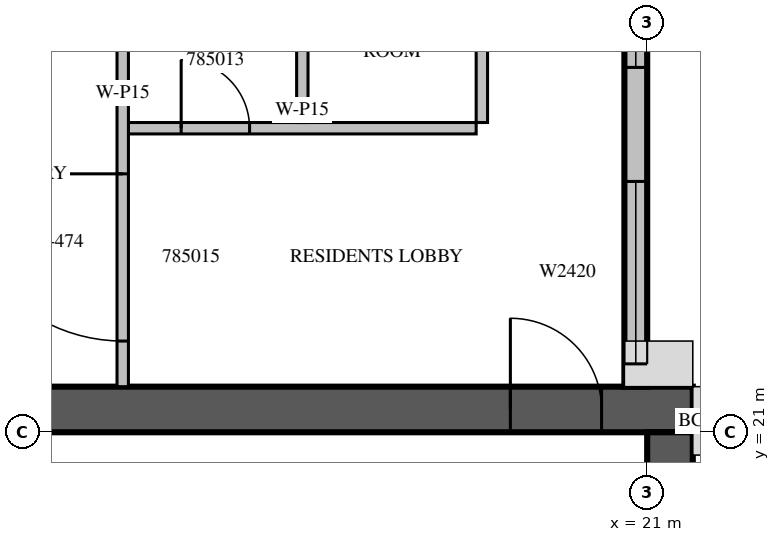
"""IFC4 building model, lengths in metres.
Left out: names, types, materials, properties, quantities, classifications, styles, units other than length and angle.
Written with IfcOpenShell. Run it as: python <this file> out.ifc"""

import sys

from ifc_helpers import new_model, si_unit, direction, frame, frame_2d, origin, place, context, subcontext, project, spatial, rectangle, extrude, source, transform, mapped, element, fill, save


model = new_model("IFC4")
c1 = context("Model", 3, precision=1e-05, world=origin(), true_north=direction((0.0, 1.0)))
c2 = subcontext(c1, "Body", "Model", "MODEL_VIEW")
j1 = project(units=[si_unit("LENGTHUNIT", "METRE"), si_unit("PLANEANGLEUNIT", "RADIAN")], contexts=[c1])
p1 = place(None, origin())
s1 = spatial("IfcSite", under=j1, at=p1, CompositionType="ELEMENT")
p2 = place(p1, origin())
s2 = spatial("IfcBuilding", under=s1, at=p2, CompositionType="ELEMENT")
p3 = place(p2, frame((0.0, 0.0, 358.0)))
s3 = spatial("IfcBuildingStorey", under=s2, at=p3, CompositionType="ELEMENT", Elevation=358.0)
m1 = source(origin(), c2, "Body", "SweptSolid", [
    extrude(rectangle(XDim=11.1, YDim=0.6, at=frame_2d((5.55, 0.0))), origin(), (0.0, 0.0, 1.0), 3.5),
])
p4 = place(p3, frame((10.5, 21.3, 0.0), z_axis=(0.0, 0.0, 1.0), x_axis=(1.0, 0.0, 0.0)))
e1 = element("IfcWall", 1, at=p4, inside=s3, PredefinedType="SHEAR", context=c2, shape_type="MappedRepresentation", body=[
    mapped(m1, transform((0.0, 0.0, 0.0), scale=1.0)),
])
m2 = source(origin(), c2, "Body", "SweptSolid", [
    extrude(rectangle(XDim=1.2, YDim=2.1, at=frame_2d((0.6, 1.05))), frame((0.0, 0.31, 0.0), z_axis=(0.0, -1.0, 0.0), x_axis=(1.0, 0.0, 0.0)), (0.0, 0.0, 1.0), 0.62),
])
p5 = place(p4, frame((8.7, 0.0, 0.0)))
e2 = element("IfcOpeningElement", 2, at=p5, cuts=e1, PredefinedType="OPENING", context=c2, shape_type="MappedRepresentation", body=[
    mapped(m2, transform((0.0, 0.0, 0.0), scale=1.0)),
])
m3 = source(origin(), c2, "Body", "SweptSolid", [
    extrude(rectangle(XDim=10.5, YDim=0.6, at=frame_2d((5.25, 0.0))), origin(), (0.0, 0.0, 1.0), 3.5),
])
p6 = place(p3, frame((21.3, 10.5, 0.0), z_axis=(0.0, 0.0, 1.0), x_axis=(0.0, 1.0, 0.0)))
e3 = element("IfcWall", 3, at=p6, inside=s3, PredefinedType="SHEAR", context=c2, shape_type="MappedRepresentation", body=[
    mapped(m3, transform((0.0, 0.0, 0.0), scale=1.0)),
])
m4 = source(origin(), c2, "Body", "SweptSolid", [
    extrude(rectangle(XDim=1.2, YDim=2.4, at=frame_2d((0.6, 1.2))), frame((0.0, 0.31, 0.0), z_axis=(0.0, -1.0, 0.0), x_axis=(1.0, 0.0, 0.0)), (0.0, 0.0, 1.0), 0.62),
])
p7 = place(p6, frame((5.7, 0.0, 0.6)))
e4 = element("IfcOpeningElement", 4, at=p7, cuts=e3, PredefinedType="OPENING", context=c2, shape_type="MappedRepresentation", body=[
    mapped(m4, transform((0.0, 0.0, 0.0), scale=1.0)),
])
m5 = source(origin(), c2, "Body", "SweptSolid", [
    extrude(rectangle(XDim=7.5, YDim=0.3, at=frame_2d((3.75, 0.0))), origin(), (0.0, 0.0, 1.0), 3.1),
])
p8 = place(p3, frame((20.85, 21.6, 0.0), z_axis=(0.0, 0.0, 1.0), x_axis=(0.0, 1.0, 0.0)))
e5 = element("IfcWall", 5, at=p8, inside=s3, PredefinedType="STANDARD", context=c2, shape_type="MappedRepresentation", body=[
    mapped(m5, transform((0.0, 0.0, 0.0), scale=1.0)),
])
m6 = source(origin(), c2, "Body", "SweptSolid", [
    extrude(rectangle(XDim=2.4, YDim=2.0, at=frame_2d((1.2, 1.0))), frame((0.0, 0.16, 0.0), z_axis=(0.0, -1.0, 0.0), x_axis=(1.0, 0.0, 0.0)), (0.0, 0.0, 1.0), 0.32),
])
p9 = place(p8, frame((0.3, 0.0, 0.6)))
e6 = element("IfcOpeningElement", 6, at=p9, cuts=e5, PredefinedType="OPENING", context=c2, shape_type="MappedRepresentation", body=[
    mapped(m6, transform((0.0, 0.0, 0.0), scale=1.0)),
])
m7 = source(origin(), c2, "Body", "SweptSolid", [
    extrude(rectangle(XDim=3.0, YDim=2.0, at=frame_2d((1.5, 1.0))), frame((0.0, 0.16, 0.0), z_axis=(0.0, -1.0, 0.0), x_axis=(1.0, 0.0, 0.0)), (0.0, 0.0, 1.0), 0.32),
])
p10 = place(p8, frame((4.2, 0.0, 0.6)))
e7 = element("IfcOpeningElement", 7, at=p10, cuts=e5, PredefinedType="OPENING", context=c2, shape_type="MappedRepresentation", body=[
    mapped(m7, transform((0.0, 0.0, 0.0), scale=1.0)),
])
m8 = source(origin(), c2, "Body", "SweptSolid", [
    extrude(rectangle(XDim=4.575, YDim=0.15, at=frame_2d((2.288, 0.0))), origin(), (0.0, 0.0, 1.0), 3.1),
])
p11 = place(p3, frame((14.175, 25.0, 0.0), z_axis=(0.0, 0.0, 1.0), x_axis=(1.0, 0.0, 0.0)))
e8 = element("IfcWall", 8, at=p11, inside=s3, PredefinedType="PARTITIONING", context=c2, shape_type="MappedRepresentation", body=[
    mapped(m8, transform((0.0, 0.0, 0.0), scale=1.0)),
])
m9 = source(origin(), c2, "Body", "SweptSolid", [
    extrude(rectangle(XDim=0.9, YDim=2.1, at=frame_2d((0.45, 1.05))), frame((0.0, 0.085, 0.0), z_axis=(0.0, -1.0, 0.0), x_axis=(1.0, 0.0, 0.0)), (0.0, 0.0, 1.0), 0.17),
])
p12 = place(p11, frame((0.694, 0.0, 0.0)))
e9 = element("IfcOpeningElement", 9, at=p12, cuts=e8, PredefinedType="OPENING", context=c2, shape_type="MappedRepresentation", body=[
    mapped(m9, transform((0.0, 0.0, 0.0), scale=1.0)),
])
m10 = source(origin(), c2, "Body", "SweptSolid", [
    extrude(rectangle(XDim=4.25, YDim=0.15, at=frame_2d((2.125, 0.0))), origin(), (0.0, 0.0, 1.0), 3.1),
])
p13 = place(p3, frame((18.825, 25.075, 0.0), z_axis=(0.0, 0.0, 1.0), x_axis=(0.0, 1.0, 0.0)))
e10 = element("IfcWall", 10, at=p13, inside=s3, PredefinedType="PARTITIONING", context=c2, shape_type="MappedRepresentation", body=[
    mapped(m10, transform((0.0, 0.0, 0.0), scale=1.0)),
])
m11 = source(origin(), c2, "Body", "SweptSolid", [
    extrude(rectangle(XDim=1.0, YDim=2.1, at=frame_2d((0.5, 1.05))), frame((0.0, 0.085, 0.0), z_axis=(0.0, -1.0, 0.0), x_axis=(1.0, 0.0, 0.0)), (0.0, 0.0, 1.0), 0.17),
])
p14 = place(p13, frame((1.625, 0.0, 0.0)))
e11 = element("IfcOpeningElement", 11, at=p14, cuts=e10, PredefinedType="OPENING", context=c2, shape_type="MappedRepresentation", body=[
    mapped(m11, transform((0.0, 0.0, 0.0), scale=1.0)),
])
p15 = place(p3, frame((16.463, 25.075, 0.0), z_axis=(0.0, 0.0, 1.0), x_axis=(0.0, 1.0, 0.0)))
e12 = element("IfcWall", 12, at=p15, inside=s3, PredefinedType="PARTITIONING", context=c2, shape_type="MappedRepresentation", body=[
    mapped(m10, transform((0.0, 0.0, 0.0), scale=1.0)),
])
m12 = source(origin(), c2, "Body", "SweptSolid", [
    extrude(rectangle(XDim=7.725, YDim=0.15, at=frame_2d((3.862, 0.0))), origin(), (0.0, 0.0, 1.0), 3.1),
])
p16 = place(p3, frame((14.1, 29.325, 0.0), z_axis=(0.0, 0.0, 1.0), x_axis=(0.0, -1.0, 0.0)))
e13 = element("IfcWall", 13, at=p16, inside=s3, PredefinedType="PARTITIONING", context=c2, shape_type="MappedRepresentation", body=[
    mapped(m12, transform((0.0, 0.0, 0.0), scale=1.0)),
])
m13 = source(origin(), c2, "Body", "SweptSolid", [
    extrude(rectangle(XDim=2.2, YDim=2.1, at=frame_2d((1.1, 1.05))), frame((0.0, 0.085, 0.0), z_axis=(0.0, -1.0, 0.0), x_axis=(1.0, 0.0, 0.0)), (0.0, 0.0, 1.0), 0.17),
])
p17 = place(p16, frame((4.925, 0.0, 0.0)))
e14 = element("IfcOpeningElement", 14, at=p17, cuts=e13, PredefinedType="OPENING", context=c2, shape_type="MappedRepresentation", body=[
    mapped(m13, transform((0.0, 0.0, 0.0), scale=1.0)),
])
m14 = source(origin(), c2, "Body", "SweptSolid", [
    extrude(rectangle(XDim=2.4, YDim=2.0, at=frame_2d((1.2, 1.0))), frame((0.0, 0.03, 0.0), z_axis=(0.0, -1.0, 0.0), x_axis=(1.0, 0.0, 0.0)), (0.0, 0.0, 1.0), 0.06),
])
p18 = place(p9, origin())
e15 = element("IfcWindow", 15, at=p18, inside=s3, PartitioningType="SINGLE_PANEL", PredefinedType="WINDOW", context=c2, shape_type="MappedRepresentation", body=[
    mapped(m14, transform((0.0, 0.0, 0.0), scale=1.0)),
])
fill(e6, e15)
m15 = source(origin(), c2, "Body", "SweptSolid", [
    extrude(rectangle(XDim=3.0, YDim=2.0, at=frame_2d((1.5, 1.0))), frame((0.0, 0.03, 0.0), z_axis=(0.0, -1.0, 0.0), x_axis=(1.0, 0.0, 0.0)), (0.0, 0.0, 1.0), 0.06),
])
p19 = place(p10, origin())
e16 = element("IfcWindow", 16, at=p19, inside=s3, PartitioningType="SINGLE_PANEL", PredefinedType="WINDOW", context=c2, shape_type="MappedRepresentation", body=[
    mapped(m15, transform((0.0, 0.0, 0.0), scale=1.0)),
])
fill(e7, e16)
m16 = source(origin(), c2, "Body", "SweptSolid", [
    extrude(rectangle(XDim=1.2, YDim=2.1, at=frame_2d((0.6, 1.05))), frame((0.0, 0.025, 0.0), z_axis=(0.0, -1.0, 0.0), x_axis=(1.0, 0.0, 0.0)), (0.0, 0.0, 1.0), 0.05),
])
p20 = place(p5, origin())
e17 = element("IfcDoor", 17, at=p20, inside=s3, OperationType="SINGLE_SWING_LEFT", PredefinedType="DOOR", context=c2, shape_type="MappedRepresentation", body=[
    mapped(m16, transform((0.0, 0.0, 0.0), scale=1.0)),
])
fill(e2, e17)
m17 = source(origin(), c2, "Body", "SweptSolid", [
    extrude(rectangle(XDim=0.9, YDim=2.1, at=frame_2d((0.45, 1.05))), frame((0.0, 0.025, 0.0), z_axis=(0.0, -1.0, 0.0), x_axis=(1.0, 0.0, 0.0)), (0.0, 0.0, 1.0), 0.05),
])
p21 = place(p12, origin())
e18 = element("IfcDoor", 18, at=p21, inside=s3, OperationType="SINGLE_SWING_LEFT", PredefinedType="DOOR", context=c2, shape_type="MappedRepresentation", body=[
    mapped(m17, transform((0.0, 0.0, 0.0), scale=1.0)),
])
fill(e9, e18)
m18 = source(origin(), c2, "Body", "SweptSolid", [
    extrude(rectangle(XDim=2.2, YDim=2.1, at=frame_2d((1.1, 1.05))), frame((0.0, 0.025, 0.0), z_axis=(0.0, -1.0, 0.0), x_axis=(1.0, 0.0, 0.0)), (0.0, 0.0, 1.0), 0.05),
])
p22 = place(p17, origin())
e19 = element("IfcDoor", 19, at=p22, inside=s3, OperationType="DOUBLE_DOOR_SINGLE_SWING", PredefinedType="DOOR", context=c2, shape_type="MappedRepresentation", body=[
    mapped(m18, transform((0.0, 0.0, 0.0), scale=1.0)),
])
fill(e14, e19)
save(model, sys.argv[1])
